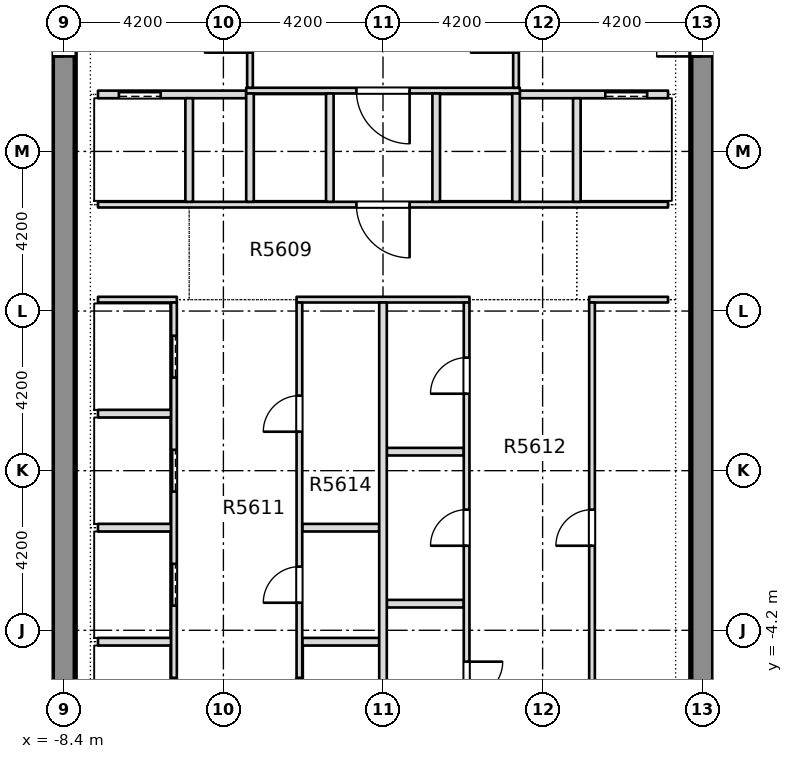
"""IFC4 building model, lengths in metres.
Left out: names, types, materials, properties, quantities, classifications, styles, units other than length and angle.
Written with IfcOpenShell. Run it as: python <this file> out.ifc"""

import sys

from ifc_helpers import new_model, si_unit, direction, frame, frame_2d, origin, place, context, subcontext, project, spatial, rectangle, extrude, element, fill, save


model = new_model("IFC4")
c1 = context("Model", 3, precision=1e-05, world=origin(), true_north=direction((0.0, 1.0)))
c2 = subcontext(c1, "Body", "Model", "MODEL_VIEW")
j1 = project(units=[si_unit("LENGTHUNIT", "METRE"), si_unit("PLANEANGLEUNIT", "RADIAN")], contexts=[c1])
p1 = place(None, origin())
s1 = spatial("IfcSite", under=j1, at=p1, CompositionType="ELEMENT")
p2 = place(p1, origin())
s2 = spatial("IfcBuilding", under=s1, at=p2, CompositionType="ELEMENT")
p3 = place(p2, frame((0.0, 0.0, 213.5)))
s3 = spatial("IfcBuildingStorey", under=s2, at=p3, CompositionType="ELEMENT", Elevation=213.5)
p4 = place(p3, frame((-8.4, -7.8, -0.4), z_axis=(0.0, 0.0, 1.0), x_axis=(0.0, 1.0, 0.0)))
e1 = element("IfcWall", 1, at=p4, inside=s3, PredefinedType="SHEAR", context=c2, shape_type="SweptSolid", body=[
    extrude(rectangle(XDim=28.95, YDim=0.6, at=frame_2d((14.475, 0.0))), origin(), (0.0, 0.0, 1.0), 3.4),
])
p5 = place(p4, frame((18.7, 0.0, 0.4)))
e2 = element("IfcOpeningElement", 2, at=p5, cuts=e1, PredefinedType="OPENING", context=c2, shape_type="SweptSolid", body=[
    extrude(rectangle(XDim=1.2, YDim=2.1, at=frame_2d((0.6, 1.05))), frame((0.0, 0.31, 0.0), z_axis=(0.0, -1.0, 0.0), x_axis=(1.0, 0.0, 0.0)), (0.0, 0.0, 1.0), 0.62),
])
p6 = place(p3, frame((8.4, -7.8, -0.4), z_axis=(0.0, 0.0, 1.0), x_axis=(0.0, 1.0, 0.0)))
e3 = element("IfcWall", 3, at=p6, inside=s3, PredefinedType="SHEAR", context=c2, shape_type="SweptSolid", body=[
    extrude(rectangle(XDim=28.95, YDim=0.6, at=frame_2d((14.475, 0.0))), origin(), (0.0, 0.0, 1.0), 3.4),
])
p7 = place(p6, frame((18.7, 0.0, 0.4)))
e4 = element("IfcOpeningElement", 4, at=p7, cuts=e3, PredefinedType="OPENING", context=c2, shape_type="SweptSolid", body=[
    extrude(rectangle(XDim=1.2, YDim=2.1, at=frame_2d((0.6, 1.05))), frame((0.0, 0.31, 0.0), z_axis=(0.0, -1.0, 0.0), x_axis=(1.0, 0.0, 0.0)), (0.0, 0.0, 1.0), 0.62),
])
p8 = place(p3, frame((-7.5, -4.5, 0.0), z_axis=(0.0, 0.0, 1.0), x_axis=(1.0, 0.0, 0.0)))
e5 = element("IfcWall", 5, at=p8, inside=s3, PredefinedType="PARTITIONING", context=c2, shape_type="SweptSolid", body=[
    extrude(rectangle(XDim=1.925, YDim=0.2, at=frame_2d((0.962, 0.0))), origin(), (0.0, 0.0, 1.0), 3.0),
])
for number, where, z_axis, x_axis in (
    (6, (-2.125, -4.5, 0.0), (0.0, 0.0, 1.0), (1.0, 0.0, 0.0)),
    (7, (0.1, -3.5, 0.0), (0.0, 0.0, 1.0), (1.0, 0.0, 0.0)),
):
    element("IfcWall", number, at=place(p3, frame(where, z_axis=z_axis, x_axis=x_axis)), inside=s3, PredefinedType="PARTITIONING", context=c2, shape_type="SweptSolid", body=[
        extrude(rectangle(XDim=2.025, YDim=0.2, at=frame_2d((1.012, 0.0))), origin(), (0.0, 0.0, 1.0), 3.0),
    ])
p9 = place(p3, frame((-7.5, -1.5, 0.0), z_axis=(0.0, 0.0, 1.0), x_axis=(1.0, 0.0, 0.0)))
e8 = element("IfcWall", 8, at=p9, inside=s3, PredefinedType="PARTITIONING", context=c2, shape_type="SweptSolid", body=[
    extrude(rectangle(XDim=1.925, YDim=0.2, at=frame_2d((0.962, 0.0))), origin(), (0.0, 0.0, 1.0), 3.0),
])
for number, where, z_axis, x_axis in (
    (9, (-2.125, -1.5, 0.0), (0.0, 0.0, 1.0), (1.0, 0.0, 0.0)),
    (10, (0.1, 0.5, 0.0), (0.0, 0.0, 1.0), (1.0, 0.0, 0.0)),
):
    element("IfcWall", number, at=place(p3, frame(where, z_axis=z_axis, x_axis=x_axis)), inside=s3, PredefinedType="PARTITIONING", context=c2, shape_type="SweptSolid", body=[
        extrude(rectangle(XDim=2.025, YDim=0.2, at=frame_2d((1.012, 0.0))), origin(), (0.0, 0.0, 1.0), 3.0),
    ])
p10 = place(p3, frame((-7.5, 1.5, 0.0), z_axis=(0.0, 0.0, 1.0), x_axis=(1.0, 0.0, 0.0)))
e11 = element("IfcWall", 11, at=p10, inside=s3, PredefinedType="PARTITIONING", context=c2, shape_type="SweptSolid", body=[
    extrude(rectangle(XDim=1.925, YDim=0.2, at=frame_2d((0.962, 0.0))), origin(), (0.0, 0.0, 1.0), 3.0),
])
p11 = place(p3, frame((-7.5, 4.5, 0.0), z_axis=(0.0, 0.0, 1.0), x_axis=(1.0, 0.0, 0.0)))
e12 = element("IfcWall", 12, at=p11, inside=s3, PredefinedType="PARTITIONING", context=c2, shape_type="SweptSolid", body=[
    extrude(rectangle(XDim=2.075, YDim=0.15, at=frame_2d((1.038, 0.0))), origin(), (0.0, 0.0, 1.0), 3.0),
])
p12 = place(p3, frame((-2.275, 4.5, 0.0), z_axis=(0.0, 0.0, 1.0), x_axis=(1.0, 0.0, 0.0)))
e13 = element("IfcWall", 13, at=p12, inside=s3, PredefinedType="PARTITIONING", context=c2, shape_type="SweptSolid", body=[
    extrude(rectangle(XDim=4.55, YDim=0.15, at=frame_2d((2.275, 0.0))), origin(), (0.0, 0.0, 1.0), 3.0),
])
p13 = place(p3, frame((5.425, 4.5, 0.0), z_axis=(0.0, 0.0, 1.0), x_axis=(1.0, 0.0, 0.0)))
e14 = element("IfcWall", 14, at=p13, inside=s3, PredefinedType="PARTITIONING", context=c2, shape_type="SweptSolid", body=[
    extrude(rectangle(XDim=2.075, YDim=0.15, at=frame_2d((1.038, 0.0))), origin(), (0.0, 0.0, 1.0), 3.0),
])
p14 = place(p3, frame((-7.5, 7.0, 0.0), z_axis=(0.0, 0.0, 1.0), x_axis=(1.0, 0.0, 0.0)))
e15 = element("IfcWall", 15, at=p14, inside=s3, PredefinedType="PARTITIONING", context=c2, shape_type="SweptSolid", body=[
    extrude(rectangle(XDim=15.0, YDim=0.15, at=frame_2d((7.5, 0.0))), origin(), (0.0, 0.0, 1.0), 3.0),
])
p15 = place(p14, frame((6.8, 0.0, 0.0)))
e16 = element("IfcOpeningElement", 16, at=p15, cuts=e15, PredefinedType="OPENING", context=c2, shape_type="SweptSolid", body=[
    extrude(rectangle(XDim=1.4, YDim=2.1, at=frame_2d((0.7, 1.05))), frame((0.0, 0.085, 0.0), z_axis=(0.0, -1.0, 0.0), x_axis=(1.0, 0.0, 0.0)), (0.0, 0.0, 1.0), 0.17),
])
p16 = place(p3, frame((-7.5, 9.9, 0.0), z_axis=(0.0, 0.0, 1.0), x_axis=(1.0, 0.0, 0.0)))
e17 = element("IfcWall", 17, at=p16, inside=s3, PredefinedType="PARTITIONING", context=c2, shape_type="SweptSolid", body=[
    extrude(rectangle(XDim=3.9, YDim=0.2, at=frame_2d((1.95, 0.0))), origin(), (0.0, 0.0, 1.0), 3.0),
])
p17 = place(p16, frame((0.55, 0.0, 0.0)))
e18 = element("IfcOpeningElement", 18, at=p17, cuts=e17, PredefinedType="OPENING", context=c2, shape_type="SweptSolid", body=[
    extrude(rectangle(XDim=1.1, YDim=2.1, at=frame_2d((0.55, 1.05))), frame((0.0, 0.11, 0.0), z_axis=(0.0, -1.0, 0.0), x_axis=(1.0, 0.0, 0.0)), (0.0, 0.0, 1.0), 0.22),
])
p18 = place(p3, frame((3.6, 9.9, 0.0), z_axis=(0.0, 0.0, 1.0), x_axis=(1.0, 0.0, 0.0)))
e19 = element("IfcWall", 19, at=p18, inside=s3, PredefinedType="PARTITIONING", context=c2, shape_type="SweptSolid", body=[
    extrude(rectangle(XDim=3.9, YDim=0.2, at=frame_2d((1.95, 0.0))), origin(), (0.0, 0.0, 1.0), 3.0),
])
p19 = place(p18, frame((2.25, 0.0, 0.0)))
e20 = element("IfcOpeningElement", 20, at=p19, cuts=e19, PredefinedType="OPENING", context=c2, shape_type="SweptSolid", body=[
    extrude(rectangle(XDim=1.1, YDim=2.1, at=frame_2d((0.55, 1.05))), frame((0.0, 0.11, 0.0), z_axis=(0.0, -1.0, 0.0), x_axis=(1.0, 0.0, 0.0)), (0.0, 0.0, 1.0), 0.22),
])
p20 = place(p3, frame((-3.6, 10.0, 0.0), z_axis=(0.0, 0.0, 1.0), x_axis=(1.0, 0.0, 0.0)))
e21 = element("IfcWall", 21, at=p20, inside=s3, PredefinedType="PARTITIONING", context=c2, shape_type="SweptSolid", body=[
    extrude(rectangle(XDim=7.2, YDim=0.15, at=frame_2d((3.6, 0.0))), origin(), (0.0, 0.0, 1.0), 3.0),
])
p21 = place(p20, frame((2.9, 0.0, 0.0)))
e22 = element("IfcOpeningElement", 22, at=p21, cuts=e21, PredefinedType="OPENING", context=c2, shape_type="SweptSolid", body=[
    extrude(rectangle(XDim=1.4, YDim=2.1, at=frame_2d((0.7, 1.05))), frame((0.0, 0.085, 0.0), z_axis=(0.0, -1.0, 0.0), x_axis=(1.0, 0.0, 0.0)), (0.0, 0.0, 1.0), 0.17),
])
p22 = place(p3, frame((-5.5, -7.799, 0.0), z_axis=(0.0, 0.0, 1.0), x_axis=(0.0, 1.0, 0.0)))
e23 = element("IfcWall", 23, at=p22, inside=s3, PredefinedType="PARTITIONING", context=c2, shape_type="SweptSolid", body=[
    extrude(rectangle(XDim=12.224, YDim=0.15, at=frame_2d((6.112, 0.0))), origin(), (0.0, 0.0, 1.0), 3.0),
])
p23 = place(p22, frame((1.249, 0.0, 0.0)))
e24 = element("IfcOpeningElement", 24, at=p23, cuts=e23, PredefinedType="OPENING", context=c2, shape_type="SweptSolid", body=[
    extrude(rectangle(XDim=1.1, YDim=2.1, at=frame_2d((0.55, 1.05))), frame((0.0, 0.085, 0.0), z_axis=(0.0, -1.0, 0.0), x_axis=(1.0, 0.0, 0.0)), (0.0, 0.0, 1.0), 0.17),
])
p24 = place(p22, frame((4.249, 0.0, 0.0)))
e25 = element("IfcOpeningElement", 25, at=p24, cuts=e23, PredefinedType="OPENING", context=c2, shape_type="SweptSolid", body=[
    extrude(rectangle(XDim=1.1, YDim=2.1, at=frame_2d((0.55, 1.05))), frame((0.0, 0.085, 0.0), z_axis=(0.0, -1.0, 0.0), x_axis=(1.0, 0.0, 0.0)), (0.0, 0.0, 1.0), 0.17),
])
p25 = place(p22, frame((7.249, 0.0, 0.0)))
e26 = element("IfcOpeningElement", 26, at=p25, cuts=e23, PredefinedType="OPENING", context=c2, shape_type="SweptSolid", body=[
    extrude(rectangle(XDim=1.1, YDim=2.1, at=frame_2d((0.55, 1.05))), frame((0.0, 0.085, 0.0), z_axis=(0.0, -1.0, 0.0), x_axis=(1.0, 0.0, 0.0)), (0.0, 0.0, 1.0), 0.17),
])
p26 = place(p22, frame((10.249, 0.0, 0.0)))
e27 = element("IfcOpeningElement", 27, at=p26, cuts=e23, PredefinedType="OPENING", context=c2, shape_type="SweptSolid", body=[
    extrude(rectangle(XDim=1.1, YDim=2.1, at=frame_2d((0.55, 1.05))), frame((0.0, 0.085, 0.0), z_axis=(0.0, -1.0, 0.0), x_axis=(1.0, 0.0, 0.0)), (0.0, 0.0, 1.0), 0.17),
])
p27 = place(p3, frame((-5.1, 7.075, 0.0), z_axis=(0.0, 0.0, 1.0), x_axis=(0.0, 1.0, 0.0)))
e28 = element("IfcWall", 28, at=p27, inside=s3, PredefinedType="PARTITIONING", context=c2, shape_type="SweptSolid", body=[
    extrude(rectangle(XDim=2.725, YDim=0.2, at=frame_2d((1.363, 0.0))), origin(), (0.0, 0.0, 1.0), 3.0),
])
p28 = place(p3, frame((-3.5, 7.075, 0.0), z_axis=(0.0, 0.0, 1.0), x_axis=(0.0, 1.0, 0.0)))
e29 = element("IfcWall", 29, at=p28, inside=s3, PredefinedType="PARTITIONING", context=c2, shape_type="SweptSolid", body=[
    extrude(rectangle(XDim=2.85, YDim=0.2, at=frame_2d((1.425, 0.0))), origin(), (0.0, 0.0, 1.0), 3.0),
])
p29 = place(p3, frame((-3.5, 10.075, 0.0), z_axis=(0.0, 0.0, 1.0), x_axis=(0.0, 1.0, 0.0)))
e30 = element("IfcWall", 30, at=p29, inside=s3, PredefinedType="PARTITIONING", context=c2, shape_type="SweptSolid", body=[
    extrude(rectangle(XDim=3.075, YDim=0.15, at=frame_2d((1.538, 0.0))), origin(), (0.0, 0.0, 1.0), 3.0),
])
p30 = place(p29, frame((0.925, 0.0, 0.0)))
e31 = element("IfcOpeningElement", 31, at=p30, cuts=e30, PredefinedType="OPENING", context=c2, shape_type="SweptSolid", body=[
    extrude(rectangle(XDim=1.2, YDim=2.1, at=frame_2d((0.6, 1.05))), frame((0.0, 0.085, 0.0), z_axis=(0.0, -1.0, 0.0), x_axis=(1.0, 0.0, 0.0)), (0.0, 0.0, 1.0), 0.17),
])
p31 = place(p3, frame((-2.2, -7.799, 0.0), z_axis=(0.0, 0.0, 1.0), x_axis=(0.0, 1.0, 0.0)))
e32 = element("IfcWall", 32, at=p31, inside=s3, PredefinedType="PARTITIONING", context=c2, shape_type="SweptSolid", body=[
    extrude(rectangle(XDim=12.224, YDim=0.15, at=frame_2d((6.112, 0.0))), origin(), (0.0, 0.0, 1.0), 3.0),
])
p32 = place(p31, frame((1.249, 0.0, 0.0)))
e33 = element("IfcOpeningElement", 33, at=p32, cuts=e32, PredefinedType="OPENING", context=c2, shape_type="SweptSolid", body=[
    extrude(rectangle(XDim=1.1, YDim=2.1, at=frame_2d((0.55, 1.05))), frame((0.0, 0.085, 0.0), z_axis=(0.0, -1.0, 0.0), x_axis=(1.0, 0.0, 0.0)), (0.0, 0.0, 1.0), 0.17),
])
p33 = place(p31, frame((4.324, 0.0, 0.0)))
e34 = element("IfcOpeningElement", 34, at=p33, cuts=e32, PredefinedType="OPENING", context=c2, shape_type="SweptSolid", body=[
    extrude(rectangle(XDim=0.95, YDim=2.1, at=frame_2d((0.475, 1.05))), frame((0.0, 0.085, 0.0), z_axis=(0.0, -1.0, 0.0), x_axis=(1.0, 0.0, 0.0)), (0.0, 0.0, 1.0), 0.17),
])
p34 = place(p31, frame((8.824, 0.0, 0.0)))
e35 = element("IfcOpeningElement", 35, at=p34, cuts=e32, PredefinedType="OPENING", context=c2, shape_type="SweptSolid", body=[
    extrude(rectangle(XDim=0.95, YDim=2.1, at=frame_2d((0.475, 1.05))), frame((0.0, 0.085, 0.0), z_axis=(0.0, -1.0, 0.0), x_axis=(1.0, 0.0, 0.0)), (0.0, 0.0, 1.0), 0.17),
])
p35 = place(p3, frame((-1.4, 7.075, 0.0), z_axis=(0.0, 0.0, 1.0), x_axis=(0.0, 1.0, 0.0)))
e36 = element("IfcWall", 36, at=p35, inside=s3, PredefinedType="PARTITIONING", context=c2, shape_type="SweptSolid", body=[
    extrude(rectangle(XDim=2.85, YDim=0.2, at=frame_2d((1.425, 0.0))), origin(), (0.0, 0.0, 1.0), 3.0),
])
p36 = place(p3, frame((0.0, -7.799, 0.0), z_axis=(0.0, 0.0, 1.0), x_axis=(0.0, 1.0, 0.0)))
e37 = element("IfcWall", 37, at=p36, inside=s3, PredefinedType="PARTITIONING", context=c2, shape_type="SweptSolid", body=[
    extrude(rectangle(XDim=12.224, YDim=0.2, at=frame_2d((6.112, 0.0))), origin(), (0.0, 0.0, 1.0), 3.0),
])
p37 = place(p3, frame((1.4, 7.075, 0.0), z_axis=(0.0, 0.0, 1.0), x_axis=(0.0, 1.0, 0.0)))
e38 = element("IfcWall", 38, at=p37, inside=s3, PredefinedType="PARTITIONING", context=c2, shape_type="SweptSolid", body=[
    extrude(rectangle(XDim=2.85, YDim=0.2, at=frame_2d((1.425, 0.0))), origin(), (0.0, 0.0, 1.0), 3.0),
])
p38 = place(p3, frame((2.2, -7.799, 0.0), z_axis=(0.0, 0.0, 1.0), x_axis=(0.0, 1.0, 0.0)))
e39 = element("IfcWall", 39, at=p38, inside=s3, PredefinedType="PARTITIONING", context=c2, shape_type="SweptSolid", body=[
    extrude(rectangle(XDim=12.224, YDim=0.15, at=frame_2d((6.112, 0.0))), origin(), (0.0, 0.0, 1.0), 3.0),
])
p39 = place(p38, frame((1.824, 0.0, 0.0)))
e40 = element("IfcOpeningElement", 40, at=p39, cuts=e39, PredefinedType="OPENING", context=c2, shape_type="SweptSolid", body=[
    extrude(rectangle(XDim=0.95, YDim=2.1, at=frame_2d((0.475, 1.05))), frame((0.0, 0.085, 0.0), z_axis=(0.0, -1.0, 0.0), x_axis=(1.0, 0.0, 0.0)), (0.0, 0.0, 1.0), 0.17),
])
p40 = place(p38, frame((5.824, 0.0, 0.0)))
e41 = element("IfcOpeningElement", 41, at=p40, cuts=e39, PredefinedType="OPENING", context=c2, shape_type="SweptSolid", body=[
    extrude(rectangle(XDim=0.95, YDim=2.1, at=frame_2d((0.475, 1.05))), frame((0.0, 0.085, 0.0), z_axis=(0.0, -1.0, 0.0), x_axis=(1.0, 0.0, 0.0)), (0.0, 0.0, 1.0), 0.17),
])
p41 = place(p38, frame((9.824, 0.0, 0.0)))
e42 = element("IfcOpeningElement", 42, at=p41, cuts=e39, PredefinedType="OPENING", context=c2, shape_type="SweptSolid", body=[
    extrude(rectangle(XDim=0.95, YDim=2.1, at=frame_2d((0.475, 1.05))), frame((0.0, 0.085, 0.0), z_axis=(0.0, -1.0, 0.0), x_axis=(1.0, 0.0, 0.0)), (0.0, 0.0, 1.0), 0.17),
])
p42 = place(p3, frame((3.5, 7.075, 0.0), z_axis=(0.0, 0.0, 1.0), x_axis=(0.0, 1.0, 0.0)))
e43 = element("IfcWall", 43, at=p42, inside=s3, PredefinedType="PARTITIONING", context=c2, shape_type="SweptSolid", body=[
    extrude(rectangle(XDim=2.85, YDim=0.2, at=frame_2d((1.425, 0.0))), origin(), (0.0, 0.0, 1.0), 3.0),
])
p43 = place(p3, frame((3.5, 10.075, 0.0), z_axis=(0.0, 0.0, 1.0), x_axis=(0.0, 1.0, 0.0)))
e44 = element("IfcWall", 44, at=p43, inside=s3, PredefinedType="PARTITIONING", context=c2, shape_type="SweptSolid", body=[
    extrude(rectangle(XDim=3.075, YDim=0.15, at=frame_2d((1.538, 0.0))), origin(), (0.0, 0.0, 1.0), 3.0),
])
p44 = place(p43, frame((0.925, 0.0, 0.0)))
e45 = element("IfcOpeningElement", 45, at=p44, cuts=e44, PredefinedType="OPENING", context=c2, shape_type="SweptSolid", body=[
    extrude(rectangle(XDim=1.2, YDim=2.1, at=frame_2d((0.6, 1.05))), frame((0.0, 0.085, 0.0), z_axis=(0.0, -1.0, 0.0), x_axis=(1.0, 0.0, 0.0)), (0.0, 0.0, 1.0), 0.17),
])
p45 = place(p3, frame((5.1, 7.075, 0.0), z_axis=(0.0, 0.0, 1.0), x_axis=(0.0, 1.0, 0.0)))
e46 = element("IfcWall", 46, at=p45, inside=s3, PredefinedType="PARTITIONING", context=c2, shape_type="SweptSolid", body=[
    extrude(rectangle(XDim=2.725, YDim=0.2, at=frame_2d((1.363, 0.0))), origin(), (0.0, 0.0, 1.0), 3.0),
])
p46 = place(p3, frame((5.5, -7.799, 0.0), z_axis=(0.0, 0.0, 1.0), x_axis=(0.0, 1.0, 0.0)))
e47 = element("IfcWall", 47, at=p46, inside=s3, PredefinedType="PARTITIONING", context=c2, shape_type="SweptSolid", body=[
    extrude(rectangle(XDim=12.224, YDim=0.15, at=frame_2d((6.112, 0.0))), origin(), (0.0, 0.0, 1.0), 3.0),
])
p47 = place(p46, frame((5.824, 0.0, 0.0)))
e48 = element("IfcOpeningElement", 48, at=p47, cuts=e47, PredefinedType="OPENING", context=c2, shape_type="SweptSolid", body=[
    extrude(rectangle(XDim=0.95, YDim=2.1, at=frame_2d((0.475, 1.05))), frame((0.0, 0.085, 0.0), z_axis=(0.0, -1.0, 0.0), x_axis=(1.0, 0.0, 0.0)), (0.0, 0.0, 1.0), 0.17),
])
p48 = place(p23, origin())
e49 = element("IfcDoor", 49, at=p48, inside=s3, OperationType="SLIDING_TO_LEFT", PredefinedType="DOOR", context=c2, shape_type="SweptSolid", body=[
    extrude(rectangle(XDim=1.1, YDim=2.1, at=frame_2d((0.55, 1.05))), frame((0.0, 0.025, 0.0), z_axis=(0.0, -1.0, 0.0), x_axis=(1.0, 0.0, 0.0)), (0.0, 0.0, 1.0), 0.05),
])
fill(e24, e49)
p49 = place(p24, origin())
e50 = element("IfcDoor", 50, at=p49, inside=s3, OperationType="SLIDING_TO_LEFT", PredefinedType="DOOR", context=c2, shape_type="SweptSolid", body=[
    extrude(rectangle(XDim=1.1, YDim=2.1, at=frame_2d((0.55, 1.05))), frame((0.0, 0.025, 0.0), z_axis=(0.0, -1.0, 0.0), x_axis=(1.0, 0.0, 0.0)), (0.0, 0.0, 1.0), 0.05),
])
fill(e25, e50)
p50 = place(p25, origin())
e51 = element("IfcDoor", 51, at=p50, inside=s3, OperationType="SLIDING_TO_LEFT", PredefinedType="DOOR", context=c2, shape_type="SweptSolid", body=[
    extrude(rectangle(XDim=1.1, YDim=2.1, at=frame_2d((0.55, 1.05))), frame((0.0, 0.025, 0.0), z_axis=(0.0, -1.0, 0.0), x_axis=(1.0, 0.0, 0.0)), (0.0, 0.0, 1.0), 0.05),
])
fill(e26, e51)
p51 = place(p26, origin())
e52 = element("IfcDoor", 52, at=p51, inside=s3, OperationType="SLIDING_TO_LEFT", PredefinedType="DOOR", context=c2, shape_type="SweptSolid", body=[
    extrude(rectangle(XDim=1.1, YDim=2.1, at=frame_2d((0.55, 1.05))), frame((0.0, 0.025, 0.0), z_axis=(0.0, -1.0, 0.0), x_axis=(1.0, 0.0, 0.0)), (0.0, 0.0, 1.0), 0.05),
])
fill(e27, e52)
p52 = place(p32, origin())
e53 = element("IfcDoor", 53, at=p52, inside=s3, OperationType="SLIDING_TO_LEFT", PredefinedType="DOOR", context=c2, shape_type="SweptSolid", body=[
    extrude(rectangle(XDim=1.1, YDim=2.1, at=frame_2d((0.55, 1.05))), frame((0.0, 0.025, 0.0), z_axis=(0.0, -1.0, 0.0), x_axis=(1.0, 0.0, 0.0)), (0.0, 0.0, 1.0), 0.05),
])
fill(e33, e53)
p53 = place(p33, origin())
e54 = element("IfcDoor", 54, at=p53, inside=s3, OperationType="SINGLE_SWING_RIGHT", PredefinedType="DOOR", context=c2, shape_type="SweptSolid", body=[
    extrude(rectangle(XDim=0.95, YDim=2.1, at=frame_2d((0.475, 1.05))), frame((0.0, 0.025, 0.0), z_axis=(0.0, -1.0, 0.0), x_axis=(1.0, 0.0, 0.0)), (0.0, 0.0, 1.0), 0.05),
])
fill(e34, e54)
p54 = place(p34, origin())
e55 = element("IfcDoor", 55, at=p54, inside=s3, OperationType="SINGLE_SWING_LEFT", PredefinedType="DOOR", context=c2, shape_type="SweptSolid", body=[
    extrude(rectangle(XDim=0.95, YDim=2.1, at=frame_2d((0.475, 1.05))), frame((0.0, 0.025, 0.0), z_axis=(0.0, -1.0, 0.0), x_axis=(1.0, 0.0, 0.0)), (0.0, 0.0, 1.0), 0.05),
])
fill(e35, e55)
p55 = place(p39, origin())
e56 = element("IfcDoor", 56, at=p55, inside=s3, OperationType="SINGLE_SWING_RIGHT", PredefinedType="DOOR", context=c2, shape_type="SweptSolid", body=[
    extrude(rectangle(XDim=0.95, YDim=2.1, at=frame_2d((0.475, 1.05))), frame((0.0, 0.025, 0.0), z_axis=(0.0, -1.0, 0.0), x_axis=(1.0, 0.0, 0.0)), (0.0, 0.0, 1.0), 0.05),
])
fill(e40, e56)
p56 = place(p40, origin())
e57 = element("IfcDoor", 57, at=p56, inside=s3, OperationType="SINGLE_SWING_RIGHT", PredefinedType="DOOR", context=c2, shape_type="SweptSolid", body=[
    extrude(rectangle(XDim=0.95, YDim=2.1, at=frame_2d((0.475, 1.05))), frame((0.0, 0.025, 0.0), z_axis=(0.0, -1.0, 0.0), x_axis=(1.0, 0.0, 0.0)), (0.0, 0.0, 1.0), 0.05),
])
fill(e41, e57)
p57 = place(p41, origin())
e58 = element("IfcDoor", 58, at=p57, inside=s3, OperationType="SINGLE_SWING_LEFT", PredefinedType="DOOR", context=c2, shape_type="SweptSolid", body=[
    extrude(rectangle(XDim=0.95, YDim=2.1, at=frame_2d((0.475, 1.05))), frame((0.0, 0.025, 0.0), z_axis=(0.0, -1.0, 0.0), x_axis=(1.0, 0.0, 0.0)), (0.0, 0.0, 1.0), 0.05),
])
fill(e42, e58)
p58 = place(p47, origin())
e59 = element("IfcDoor", 59, at=p58, inside=s3, OperationType="SINGLE_SWING_LEFT", PredefinedType="DOOR", context=c2, shape_type="SweptSolid", body=[
    extrude(rectangle(XDim=0.95, YDim=2.1, at=frame_2d((0.475, 1.05))), frame((0.0, 0.025, 0.0), z_axis=(0.0, -1.0, 0.0), x_axis=(1.0, 0.0, 0.0)), (0.0, 0.0, 1.0), 0.05),
])
fill(e48, e59)
p59 = place(p17, origin())
e60 = element("IfcDoor", 60, at=p59, inside=s3, OperationType="SLIDING_TO_RIGHT", PredefinedType="DOOR", context=c2, shape_type="SweptSolid", body=[
    extrude(rectangle(XDim=1.1, YDim=2.1, at=frame_2d((0.55, 1.05))), frame((0.0, 0.025, 0.0), z_axis=(0.0, -1.0, 0.0), x_axis=(1.0, 0.0, 0.0)), (0.0, 0.0, 1.0), 0.05),
])
fill(e18, e60)
p60 = place(p19, origin())
e61 = element("IfcDoor", 61, at=p60, inside=s3, OperationType="SLIDING_TO_LEFT", PredefinedType="DOOR", context=c2, shape_type="SweptSolid", body=[
    extrude(rectangle(XDim=1.1, YDim=2.1, at=frame_2d((0.55, 1.05))), frame((0.0, 0.025, 0.0), z_axis=(0.0, -1.0, 0.0), x_axis=(1.0, 0.0, 0.0)), (0.0, 0.0, 1.0), 0.05),
])
fill(e20, e61)
p61 = place(p15, origin())
e62 = element("IfcDoor", 62, at=p61, inside=s3, OperationType="SINGLE_SWING_RIGHT", PredefinedType="DOOR", context=c2, shape_type="SweptSolid", body=[
    extrude(rectangle(XDim=1.4, YDim=2.1, at=frame_2d((0.7, 1.05))), frame((0.0, 0.025, 0.0), z_axis=(0.0, -1.0, 0.0), x_axis=(1.0, 0.0, 0.0)), (0.0, 0.0, 1.0), 0.05),
])
fill(e16, e62)
p62 = place(p21, origin())
e63 = element("IfcDoor", 63, at=p62, inside=s3, OperationType="SINGLE_SWING_RIGHT", PredefinedType="DOOR", context=c2, shape_type="SweptSolid", body=[
    extrude(rectangle(XDim=1.4, YDim=2.1, at=frame_2d((0.7, 1.05))), frame((0.0, 0.025, 0.0), z_axis=(0.0, -1.0, 0.0), x_axis=(1.0, 0.0, 0.0)), (0.0, 0.0, 1.0), 0.05),
])
fill(e22, e63)
p63 = place(p5, origin())
e64 = element("IfcDoor", 64, at=p63, inside=s3, OperationType="SINGLE_SWING_LEFT", PredefinedType="DOOR", context=c2, shape_type="SweptSolid", body=[
    extrude(rectangle(XDim=1.2, YDim=2.1, at=frame_2d((0.6, 1.05))), frame((0.0, 0.025, 0.0), z_axis=(0.0, -1.0, 0.0), x_axis=(1.0, 0.0, 0.0)), (0.0, 0.0, 1.0), 0.05),
])
fill(e2, e64)
p64 = place(p7, origin())
e65 = element("IfcDoor", 65, at=p64, inside=s3, OperationType="SINGLE_SWING_LEFT", PredefinedType="DOOR", context=c2, shape_type="SweptSolid", body=[
    extrude(rectangle(XDim=1.2, YDim=2.1, at=frame_2d((0.6, 1.05))), frame((0.0, 0.025, 0.0), z_axis=(0.0, -1.0, 0.0), x_axis=(1.0, 0.0, 0.0)), (0.0, 0.0, 1.0), 0.05),
])
fill(e4, e65)
save(model, sys.argv[1])
